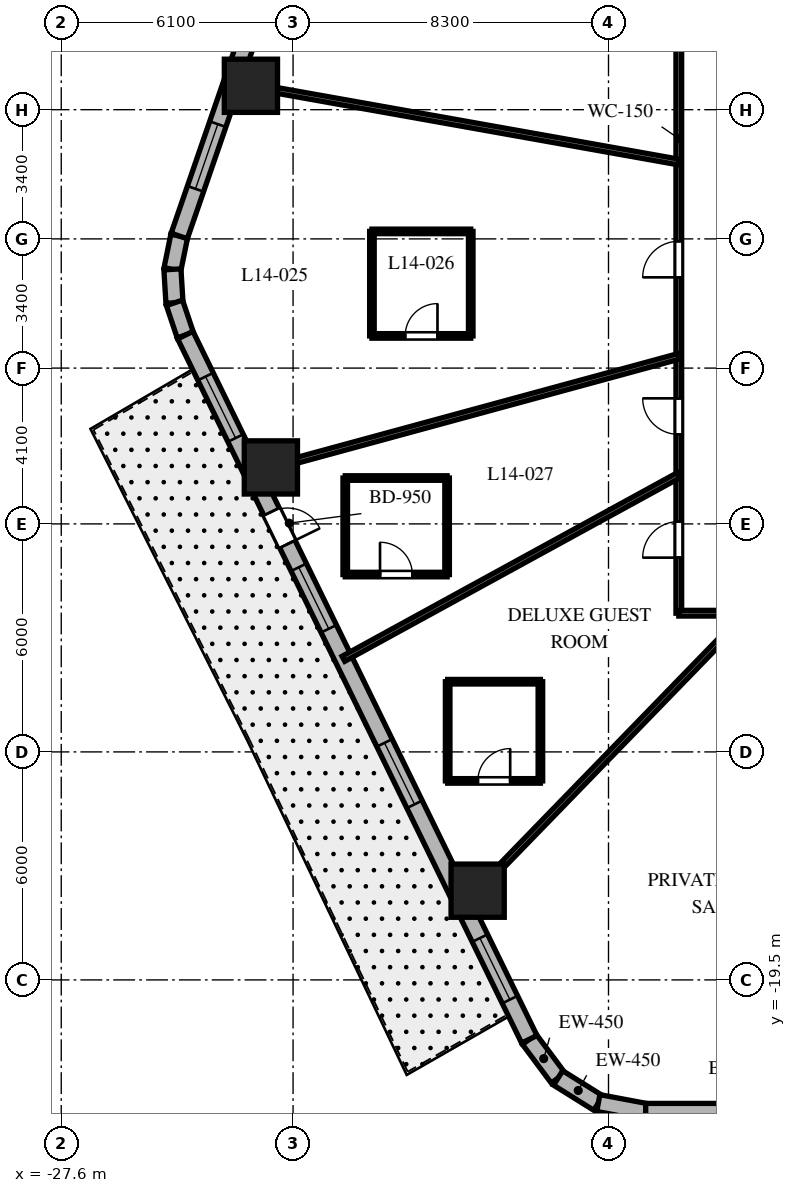
"""IFC4 building model, lengths in metres.
Left out: names, types, materials, properties, quantities, classifications, styles, units other than length and angle.
Written with IfcOpenShell. Run it as: python <this file> out.ifc"""

import sys

from ifc_helpers import new_model, si_unit, direction, frame, frame_2d, origin, origin_2d, place, context, subcontext, project, spatial, rectangle, extrude, element, fill, save


model = new_model("IFC4")
c1 = context("Model", 3, precision=1e-05, world=origin(), true_north=direction((0.0, 1.0)))
c2 = subcontext(c1, "Body", "Model", "MODEL_VIEW")
j1 = project(units=[si_unit("LENGTHUNIT", "METRE"), si_unit("PLANEANGLEUNIT", "RADIAN")], contexts=[c1])
p1 = place(None, origin())
s1 = spatial("IfcSite", under=j1, at=p1, CompositionType="ELEMENT")
p2 = place(p1, origin())
s2 = spatial("IfcBuilding", under=s1, at=p2, CompositionType="ELEMENT")
p3 = place(p2, frame((0.0, 0.0, 63.8)))
s3 = spatial("IfcBuildingStorey", under=s2, at=p3, CompositionType="ELEMENT", Elevation=63.8)
for number, where, z_axis, x_axis in (
    (1, (-22.609, 4.029, 0.0), (0.0, 0.0, 1.0), (1.0, 0.0, 0.0)),
    (2, (-22.084, -6.014, 0.0), (0.0, 0.0, 1.0), (1.0, 0.0, 0.0)),
    (3, (-16.643, -17.152, 0.0), (0.0, 0.0, 1.0), (1.0, 0.0, 0.0)),
):
    element("IfcColumn", number, at=place(p3, frame(where, z_axis=z_axis, x_axis=x_axis)), inside=s3, PredefinedType="COLUMN", context=c2, shape_type="SweptSolid", body=[
        extrude(rectangle(XDim=1.4, YDim=1.4, at=origin_2d()), origin(), (0.0, 0.0, 1.0), 3.7),
    ])
p4 = place(p3, frame((-15.284, -21.062, 0.0), z_axis=(0.0, 0.0, 1.0), x_axis=(0.597595366449, -0.801797841104, 0.0)))
e4 = element("IfcWall", 4, at=p4, inside=s3, PredefinedType="SOLIDWALL", context=c2, shape_type="SweptSolid", body=[
    extrude(rectangle(XDim=1.269, YDim=0.45, at=frame_2d((0.634, 0.0))), origin(), (0.0, 0.0, 1.0), 3.4),
])
p5 = place(p3, frame((-14.526, -22.08, 0.0), z_axis=(0.0, 0.0, 1.0), x_axis=(0.848185203596, -0.529699783275, 0.0)))
e5 = element("IfcWall", 5, at=p5, inside=s3, PredefinedType="SOLIDWALL", context=c2, shape_type="SweptSolid", body=[
    extrude(rectangle(XDim=1.247, YDim=0.45, at=frame_2d((0.624, 0.0))), origin(), (0.0, 0.0, 1.0), 3.4),
])
p6 = place(p3, frame((-13.468, -22.74, 0.0), z_axis=(0.0, 0.0, 1.0), x_axis=(0.982717174228, -0.185113358451, 0.0)))
e6 = element("IfcWall", 6, at=p6, inside=s3, PredefinedType="SOLIDWALL", context=c2, shape_type="SweptSolid", body=[
    extrude(rectangle(XDim=1.269, YDim=0.45, at=frame_2d((0.634, 0.0))), origin(), (0.0, 0.0, 1.0), 3.4),
])
p7 = place(p3, frame((-24.496, 0.077, 0.0), z_axis=(0.0, 0.0, 1.0), x_axis=(-0.199570594521, -0.979883451132, 0.0)))
e7 = element("IfcWall", 7, at=p7, inside=s3, PredefinedType="SOLIDWALL", context=c2, shape_type="SweptSolid", body=[
    extrude(rectangle(XDim=0.897, YDim=0.45, at=frame_2d((0.448, 0.0))), origin(), (0.0, 0.0, 1.0), 3.4),
])
p8 = place(p3, frame((-24.675, -0.802, 0.0), z_axis=(0.0, 0.0, 1.0), x_axis=(0.061188874166, -0.998126205286, 0.0)))
e8 = element("IfcWall", 8, at=p8, inside=s3, PredefinedType="SOLIDWALL", context=c2, shape_type="SweptSolid", body=[
    extrude(rectangle(XDim=0.882, YDim=0.45, at=frame_2d((0.441, 0.0))), origin(), (0.0, 0.0, 1.0), 3.4),
])
p9 = place(p3, frame((-24.621, -1.682, 0.0), z_axis=(0.0, 0.0, 1.0), x_axis=(0.317697451681, -0.948192137278, 0.0)))
e9 = element("IfcWall", 9, at=p9, inside=s3, PredefinedType="SOLIDWALL", context=c2, shape_type="SweptSolid", body=[
    extrude(rectangle(XDim=0.897, YDim=0.45, at=frame_2d((0.448, 0.0))), origin(), (0.0, 0.0, 1.0), 3.4),
])
p10 = place(p3, frame((-12.221, -22.975, 0.0), z_axis=(0.0, 0.0, 1.0), x_axis=(1.0, 0.0, 0.0)))
e10 = element("IfcWall", 10, at=p10, inside=s3, PredefinedType="SOLIDWALL", context=c2, shape_type="SweptSolid", body=[
    extrude(rectangle(XDim=26.389, YDim=0.45, at=frame_2d((13.195, 0.0))), origin(), (0.0, 0.0, 1.0), 3.4),
])
p11 = place(p10, frame((2.799, 0.0, 0.0)))
e11 = element("IfcOpeningElement", 11, at=p11, cuts=e10, PredefinedType="OPENING", context=c2, shape_type="SweptSolid", body=[
    extrude(rectangle(XDim=1.0, YDim=2.15, at=frame_2d((0.5, 1.075))), frame((0.0, 0.235, 0.0), z_axis=(0.0, -1.0, 0.0), x_axis=(1.0, 0.0, 0.0)), (0.0, 0.0, 1.0), 0.47),
])
p12 = place(p10, frame((12.296, 0.0, 0.8)))
e12 = element("IfcOpeningElement", 12, at=p12, cuts=e10, PredefinedType="OPENING", context=c2, shape_type="SweptSolid", body=[
    extrude(rectangle(XDim=1.8, YDim=1.8, at=frame_2d((0.9, 0.9))), frame((0.0, 0.235, 0.0), z_axis=(0.0, -1.0, 0.0), x_axis=(1.0, 0.0, 0.0)), (0.0, 0.0, 1.0), 0.47),
])
p13 = place(p10, frame((22.938, 0.0, 0.8)))
e13 = element("IfcOpeningElement", 13, at=p13, cuts=e10, PredefinedType="OPENING", context=c2, shape_type="SweptSolid", body=[
    extrude(rectangle(XDim=1.8, YDim=1.8, at=frame_2d((0.9, 0.9))), frame((0.0, 0.235, 0.0), z_axis=(0.0, -1.0, 0.0), x_axis=(1.0, 0.0, 0.0)), (0.0, 0.0, 1.0), 0.47),
])
p14 = place(p3, frame((-17.39, 20.678, 0.0), z_axis=(0.0, 0.0, 1.0), x_axis=(-0.326068018294, -0.945346310854, 0.0)))
e14 = element("IfcWall", 14, at=p14, inside=s3, PredefinedType="SOLIDWALL", context=c2, shape_type="SweptSolid", body=[
    extrude(rectangle(XDim=21.793, YDim=0.45, at=frame_2d((10.896, 0.0))), origin(), (0.0, 0.0, 1.0), 3.4),
])
p15 = place(p14, frame((1.26, 0.0, 0.8)))
e15 = element("IfcOpeningElement", 15, at=p15, cuts=e14, PredefinedType="OPENING", context=c2, shape_type="SweptSolid", body=[
    extrude(rectangle(XDim=1.8, YDim=1.8, at=frame_2d((0.9, 0.9))), frame((0.0, 0.235, 0.0), z_axis=(0.0, -1.0, 0.0), x_axis=(1.0, 0.0, 0.0)), (0.0, 0.0, 1.0), 0.47),
])
p16 = place(p14, frame((9.943, 0.0, 0.8)))
e16 = element("IfcOpeningElement", 16, at=p16, cuts=e14, PredefinedType="OPENING", context=c2, shape_type="SweptSolid", body=[
    extrude(rectangle(XDim=1.8, YDim=1.8, at=frame_2d((0.9, 0.9))), frame((0.0, 0.235, 0.0), z_axis=(0.0, -1.0, 0.0), x_axis=(1.0, 0.0, 0.0)), (0.0, 0.0, 1.0), 0.47),
])
p17 = place(p14, frame((18.68, 0.0, 0.8)))
e17 = element("IfcOpeningElement", 17, at=p17, cuts=e14, PredefinedType="OPENING", context=c2, shape_type="SweptSolid", body=[
    extrude(rectangle(XDim=1.8, YDim=1.8, at=frame_2d((0.9, 0.9))), frame((0.0, 0.235, 0.0), z_axis=(0.0, -1.0, 0.0), x_axis=(1.0, 0.0, 0.0)), (0.0, 0.0, 1.0), 0.47),
])
p18 = place(p3, frame((-24.336, -2.532, 0.0), z_axis=(0.0, 0.0, 1.0), x_axis=(0.438931326393, -0.898520612291, 0.0)))
e18 = element("IfcWall", 18, at=p18, inside=s3, PredefinedType="SOLIDWALL", context=c2, shape_type="SweptSolid", body=[
    extrude(rectangle(XDim=20.623, YDim=0.45, at=frame_2d((10.312, 0.0))), origin(), (0.0, 0.0, 1.0), 3.4),
])
p19 = place(p18, frame((5.171, 0.0, 0.0)))
e19 = element("IfcOpeningElement", 19, at=p19, cuts=e18, PredefinedType="OPENING", context=c2, shape_type="SweptSolid", body=[
    extrude(rectangle(XDim=0.95, YDim=2.15, at=frame_2d((0.475, 1.075))), frame((0.0, 0.235, 0.0), z_axis=(0.0, -1.0, 0.0), x_axis=(1.0, 0.0, 0.0)), (0.0, 0.0, 1.0), 0.47),
])
p20 = place(p18, frame((1.214, 0.0, 0.8)))
e20 = element("IfcOpeningElement", 20, at=p20, cuts=e18, PredefinedType="OPENING", context=c2, shape_type="SweptSolid", body=[
    extrude(rectangle(XDim=1.8, YDim=1.8, at=frame_2d((0.9, 0.9))), frame((0.0, 0.235, 0.0), z_axis=(0.0, -1.0, 0.0), x_axis=(1.0, 0.0, 0.0)), (0.0, 0.0, 1.0), 0.47),
])
p21 = place(p18, frame((6.8, 0.0, 0.8)))
e21 = element("IfcOpeningElement", 21, at=p21, cuts=e18, PredefinedType="OPENING", context=c2, shape_type="SweptSolid", body=[
    extrude(rectangle(XDim=1.8, YDim=1.8, at=frame_2d((0.9, 0.9))), frame((0.0, 0.235, 0.0), z_axis=(0.0, -1.0, 0.0), x_axis=(1.0, 0.0, 0.0)), (0.0, 0.0, 1.0), 0.47),
])
p22 = place(p18, frame((11.942, 0.0, 0.8)))
e22 = element("IfcOpeningElement", 22, at=p22, cuts=e18, PredefinedType="OPENING", context=c2, shape_type="SweptSolid", body=[
    extrude(rectangle(XDim=1.8, YDim=1.8, at=frame_2d((0.9, 0.9))), frame((0.0, 0.235, 0.0), z_axis=(0.0, -1.0, 0.0), x_axis=(1.0, 0.0, 0.0)), (0.0, 0.0, 1.0), 0.47),
])
p23 = place(p18, frame((17.66, 0.0, 0.8)))
e23 = element("IfcOpeningElement", 23, at=p23, cuts=e18, PredefinedType="OPENING", context=c2, shape_type="SweptSolid", body=[
    extrude(rectangle(XDim=1.8, YDim=1.8, at=frame_2d((0.9, 0.9))), frame((0.0, 0.235, 0.0), z_axis=(0.0, -1.0, 0.0), x_axis=(1.0, 0.0, 0.0)), (0.0, 0.0, 1.0), 0.47),
])
p24 = place(p3, frame((-11.35, -9.85, 0.0), z_axis=(0.0, 0.0, 1.0), x_axis=(0.0, 1.0, 0.0)))
e24 = element("IfcWall", 24, at=p24, inside=s3, PredefinedType="PARTITIONING", context=c2, shape_type="SweptSolid", body=[
    extrude(rectangle(XDim=19.7, YDim=0.15, at=frame_2d((9.85, 0.0))), origin(), (0.0, 0.0, 1.0), 2.84),
])
p25 = place(p24, frame((15.191, 0.0, 0.0)))
e25 = element("IfcOpeningElement", 25, at=p25, cuts=e24, PredefinedType="OPENING", context=c2, shape_type="SweptSolid", body=[
    extrude(rectangle(XDim=0.95, YDim=2.03, at=frame_2d((0.475, 1.015))), frame((0.0, 0.085, 0.0), z_axis=(0.0, -1.0, 0.0), x_axis=(1.0, 0.0, 0.0)), (0.0, 0.0, 1.0), 0.17),
])
p26 = place(p24, frame((8.838, 0.0, 0.0)))
e26 = element("IfcOpeningElement", 26, at=p26, cuts=e24, PredefinedType="OPENING", context=c2, shape_type="SweptSolid", body=[
    extrude(rectangle(XDim=0.95, YDim=2.03, at=frame_2d((0.475, 1.015))), frame((0.0, 0.085, 0.0), z_axis=(0.0, -1.0, 0.0), x_axis=(1.0, 0.0, 0.0)), (0.0, 0.0, 1.0), 0.17),
])
p27 = place(p24, frame((4.704, 0.0, 0.0)))
e27 = element("IfcOpeningElement", 27, at=p27, cuts=e24, PredefinedType="OPENING", context=c2, shape_type="SweptSolid", body=[
    extrude(rectangle(XDim=0.95, YDim=2.03, at=frame_2d((0.475, 1.015))), frame((0.0, 0.085, 0.0), z_axis=(0.0, -1.0, 0.0), x_axis=(1.0, 0.0, 0.0)), (0.0, 0.0, 1.0), 0.17),
])
p28 = place(p24, frame((1.462, 0.0, 0.0)))
e28 = element("IfcOpeningElement", 28, at=p28, cuts=e24, PredefinedType="OPENING", context=c2, shape_type="SweptSolid", body=[
    extrude(rectangle(XDim=0.95, YDim=2.03, at=frame_2d((0.475, 1.015))), frame((0.0, 0.085, 0.0), z_axis=(0.0, -1.0, 0.0), x_axis=(1.0, 0.0, 0.0)), (0.0, 0.0, 1.0), 0.17),
])
p29 = place(p3, frame((11.35, -9.85, 0.0), z_axis=(0.0, 0.0, 1.0), x_axis=(-1.0, 0.0, 0.0)))
e29 = element("IfcWall", 29, at=p29, inside=s3, PredefinedType="PARTITIONING", context=c2, shape_type="SweptSolid", body=[
    extrude(rectangle(XDim=22.7, YDim=0.15, at=frame_2d((11.35, 0.0))), origin(), (0.0, 0.0, 1.0), 2.84),
])
p30 = place(p29, frame((17.225, 0.0, 0.0)))
e30 = element("IfcOpeningElement", 30, at=p30, cuts=e29, PredefinedType="OPENING", context=c2, shape_type="SweptSolid", body=[
    extrude(rectangle(XDim=0.95, YDim=2.03, at=frame_2d((0.475, 1.015))), frame((0.0, 0.085, 0.0), z_axis=(0.0, -1.0, 0.0), x_axis=(1.0, 0.0, 0.0)), (0.0, 0.0, 1.0), 0.17),
])
p31 = place(p29, frame((10.444, 0.0, 0.0)))
e31 = element("IfcOpeningElement", 31, at=p31, cuts=e29, PredefinedType="OPENING", context=c2, shape_type="SweptSolid", body=[
    extrude(rectangle(XDim=0.95, YDim=2.03, at=frame_2d((0.475, 1.015))), frame((0.0, 0.085, 0.0), z_axis=(0.0, -1.0, 0.0), x_axis=(1.0, 0.0, 0.0)), (0.0, 0.0, 1.0), 0.17),
])
p32 = place(p29, frame((3.369, 0.0, 0.0)))
e32 = element("IfcOpeningElement", 32, at=p32, cuts=e29, PredefinedType="OPENING", context=c2, shape_type="SweptSolid", body=[
    extrude(rectangle(XDim=0.95, YDim=2.03, at=frame_2d((0.475, 1.015))), frame((0.0, 0.085, 0.0), z_axis=(0.0, -1.0, 0.0), x_axis=(1.0, 0.0, 0.0)), (0.0, 0.0, 1.0), 0.17),
])
p33 = place(p3, frame((-11.35, 2.023, 0.0), z_axis=(0.0, 0.0, 1.0), x_axis=(-0.984493741877, 0.17541970301, 0.0)))
e33 = element("IfcWall", 33, at=p33, inside=s3, PredefinedType="PARTITIONING", context=c2, shape_type="SweptSolid", body=[
    extrude(rectangle(XDim=11.937, YDim=0.15, at=frame_2d((5.969, 0.0))), origin(), (0.0, 0.0, 1.0), 2.54),
])
p34 = place(p3, frame((-11.35, -3.091, 0.0), z_axis=(0.0, 0.0, 1.0), x_axis=(-0.964859685283, -0.262765651704, 0.0)))
e34 = element("IfcWall", 34, at=p34, inside=s3, PredefinedType="PARTITIONING", context=c2, shape_type="SweptSolid", body=[
    extrude(rectangle(XDim=11.629, YDim=0.15, at=frame_2d((5.814, 0.0))), origin(), (0.0, 0.0, 1.0), 2.54),
])
p35 = place(p3, frame((-11.35, -6.217, 0.0), z_axis=(0.0, 0.0, 1.0), x_axis=(-0.877047587135, -0.480403507378, 0.0)))
e35 = element("IfcWall", 35, at=p35, inside=s3, PredefinedType="PARTITIONING", context=c2, shape_type="SweptSolid", body=[
    extrude(rectangle(XDim=10.062, YDim=0.15, at=frame_2d((5.031, 0.0))), origin(), (0.0, 0.0, 1.0), 2.54),
])
p36 = place(p3, frame((-9.558, -9.85, 0.0), z_axis=(0.0, 0.0, 1.0), x_axis=(-0.69638346089, -0.717669893056, 0.0)))
e36 = element("IfcWall", 36, at=p36, inside=s3, PredefinedType="PARTITIONING", context=c2, shape_type="SweptSolid", body=[
    extrude(rectangle(XDim=10.701, YDim=0.15, at=frame_2d((5.351, 0.0))), origin(), (0.0, 0.0, 1.0), 2.54),
])
p37 = place(p3, frame((-19.425, -2.553, 0.0), z_axis=(0.0, 0.0, 1.0), x_axis=(1.0, 0.0, 0.0)))
e37 = element("IfcWall", 37, at=p37, inside=s3, PredefinedType="PARTITIONING", context=c2, shape_type="SweptSolid", body=[
    extrude(rectangle(XDim=2.6, YDim=0.12, at=frame_2d((1.3, 0.0))), origin(), (0.0, 0.0, 1.0), 2.84),
])
p38 = place(p37, frame((0.875, 0.0, 0.0)))
e38 = element("IfcOpeningElement", 38, at=p38, cuts=e37, PredefinedType="OPENING", context=c2, shape_type="SweptSolid", body=[
    extrude(rectangle(XDim=0.85, YDim=2.03, at=frame_2d((0.425, 1.015))), frame((0.0, 0.07, 0.0), z_axis=(0.0, -1.0, 0.0), x_axis=(1.0, 0.0, 0.0)), (0.0, 0.0, 1.0), 0.14),
])
p39 = place(p3, frame((-16.825, -2.553, 0.0), z_axis=(0.0, 0.0, 1.0), x_axis=(0.0, 1.0, 0.0)))
e39 = element("IfcWall", 39, at=p39, inside=s3, PredefinedType="PARTITIONING", context=c2, shape_type="SweptSolid", body=[
    extrude(rectangle(XDim=2.75, YDim=0.12, at=frame_2d((1.375, 0.0))), origin(), (0.0, 0.0, 1.0), 3.4),
])
p40 = place(p3, frame((-16.825, 0.197, 0.0), z_axis=(0.0, 0.0, 1.0), x_axis=(-1.0, 0.0, 0.0)))
e40 = element("IfcWall", 40, at=p40, inside=s3, PredefinedType="PARTITIONING", context=c2, shape_type="SweptSolid", body=[
    extrude(rectangle(XDim=2.6, YDim=0.12, at=frame_2d((1.3, 0.0))), origin(), (0.0, 0.0, 1.0), 2.84),
])
p41 = place(p3, frame((-19.425, 0.197, 0.0), z_axis=(0.0, 0.0, 1.0), x_axis=(0.0, -1.0, 0.0)))
e41 = element("IfcWall", 41, at=p41, inside=s3, PredefinedType="PARTITIONING", context=c2, shape_type="SweptSolid", body=[
    extrude(rectangle(XDim=2.75, YDim=0.12, at=frame_2d((1.375, 0.0))), origin(), (0.0, 0.0, 1.0), 3.4),
])
p42 = place(p3, frame((-20.127, -8.833, 0.0), z_axis=(0.0, 0.0, 1.0), x_axis=(1.0, 0.0, 0.0)))
e42 = element("IfcWall", 42, at=p42, inside=s3, PredefinedType="PARTITIONING", context=c2, shape_type="SweptSolid", body=[
    extrude(rectangle(XDim=2.68, YDim=0.12, at=frame_2d((1.34, 0.0))), origin(), (0.0, 0.0, 1.0), 3.4),
])
p43 = place(p42, frame((0.915, 0.0, 0.0)))
e43 = element("IfcOpeningElement", 43, at=p43, cuts=e42, PredefinedType="OPENING", context=c2, shape_type="SweptSolid", body=[
    extrude(rectangle(XDim=0.85, YDim=2.03, at=frame_2d((0.425, 1.015))), frame((0.0, 0.07, 0.0), z_axis=(0.0, -1.0, 0.0), x_axis=(1.0, 0.0, 0.0)), (0.0, 0.0, 1.0), 0.14),
])
p44 = place(p3, frame((-17.447, -8.833, 0.0), z_axis=(0.0, 0.0, 1.0), x_axis=(0.0, 1.0, 0.0)))
e44 = element("IfcWall", 44, at=p44, inside=s3, PredefinedType="PARTITIONING", context=c2, shape_type="SweptSolid", body=[
    extrude(rectangle(XDim=2.54, YDim=0.12, at=frame_2d((1.27, 0.0))), origin(), (0.0, 0.0, 1.0), 2.84),
])
p45 = place(p3, frame((-17.447, -6.293, 0.0), z_axis=(0.0, 0.0, 1.0), x_axis=(-1.0, 0.0, 0.0)))
e45 = element("IfcWall", 45, at=p45, inside=s3, PredefinedType="PARTITIONING", context=c2, shape_type="SweptSolid", body=[
    extrude(rectangle(XDim=2.68, YDim=0.12, at=frame_2d((1.34, 0.0))), origin(), (0.0, 0.0, 1.0), 2.84),
])
p46 = place(p3, frame((-20.127, -6.293, 0.0), z_axis=(0.0, 0.0, 1.0), x_axis=(0.0, -1.0, 0.0)))
e46 = element("IfcWall", 46, at=p46, inside=s3, PredefinedType="PARTITIONING", context=c2, shape_type="SweptSolid", body=[
    extrude(rectangle(XDim=2.54, YDim=0.12, at=frame_2d((1.27, 0.0))), origin(), (0.0, 0.0, 1.0), 2.84),
])
p47 = place(p3, frame((-17.432, -14.263, 0.0), z_axis=(0.0, 0.0, 1.0), x_axis=(1.0, 0.0, 0.0)))
e47 = element("IfcWall", 47, at=p47, inside=s3, PredefinedType="PARTITIONING", context=c2, shape_type="SweptSolid", body=[
    extrude(rectangle(XDim=2.44, YDim=0.12, at=frame_2d((1.22, 0.0))), origin(), (0.0, 0.0, 1.0), 3.4),
])
p48 = place(p47, frame((0.795, 0.0, 0.0)))
e48 = element("IfcOpeningElement", 48, at=p48, cuts=e47, PredefinedType="OPENING", context=c2, shape_type="SweptSolid", body=[
    extrude(rectangle(XDim=0.85, YDim=2.03, at=frame_2d((0.425, 1.015))), frame((0.0, 0.07, 0.0), z_axis=(0.0, -1.0, 0.0), x_axis=(1.0, 0.0, 0.0)), (0.0, 0.0, 1.0), 0.14),
])
p49 = place(p3, frame((-14.992, -14.263, 0.0), z_axis=(0.0, 0.0, 1.0), x_axis=(0.0, 1.0, 0.0)))
e49 = element("IfcWall", 49, at=p49, inside=s3, PredefinedType="PARTITIONING", context=c2, shape_type="SweptSolid", body=[
    extrude(rectangle(XDim=2.61, YDim=0.12, at=frame_2d((1.305, 0.0))), origin(), (0.0, 0.0, 1.0), 2.927),
])
p50 = place(p3, frame((-14.992, -11.653, 0.0), z_axis=(0.0, 0.0, 1.0), x_axis=(-1.0, 0.0, 0.0)))
e50 = element("IfcWall", 50, at=p50, inside=s3, PredefinedType="PARTITIONING", context=c2, shape_type="SweptSolid", body=[
    extrude(rectangle(XDim=2.44, YDim=0.12, at=frame_2d((1.22, 0.0))), origin(), (0.0, 0.0, 1.0), 2.927),
])
p51 = place(p3, frame((-17.432, -11.653, 0.0), z_axis=(0.0, 0.0, 1.0), x_axis=(0.0, -1.0, 0.0)))
e51 = element("IfcWall", 51, at=p51, inside=s3, PredefinedType="PARTITIONING", context=c2, shape_type="SweptSolid", body=[
    extrude(rectangle(XDim=2.61, YDim=0.12, at=frame_2d((1.305, 0.0))), origin(), (0.0, 0.0, 1.0), 3.4),
])
p52 = place(p17, origin())
e52 = element("IfcWindow", 52, at=p52, inside=s3, PartitioningType="SINGLE_PANEL", PredefinedType="WINDOW", context=c2, shape_type="SweptSolid", body=[
    extrude(rectangle(XDim=1.8, YDim=1.8, at=frame_2d((0.9, 0.9))), frame((0.0, 0.03, 0.0), z_axis=(0.0, -1.0, 0.0), x_axis=(1.0, 0.0, 0.0)), (0.0, 0.0, 1.0), 0.06),
])
fill(e17, e52)
p53 = place(p19, origin())
e53 = element("IfcDoor", 53, at=p53, inside=s3, OperationType="SINGLE_SWING_RIGHT", PredefinedType="DOOR", context=c2, shape_type="SweptSolid", body=[
    extrude(rectangle(XDim=0.95, YDim=2.15, at=frame_2d((0.475, 1.075))), frame((0.0, 0.025, 0.0), z_axis=(0.0, -1.0, 0.0), x_axis=(1.0, 0.0, 0.0)), (0.0, 0.0, 1.0), 0.05),
])
fill(e19, e53)
p54 = place(p20, origin())
e54 = element("IfcWindow", 54, at=p54, inside=s3, PartitioningType="SINGLE_PANEL", PredefinedType="WINDOW", context=c2, shape_type="SweptSolid", body=[
    extrude(rectangle(XDim=1.8, YDim=1.8, at=frame_2d((0.9, 0.9))), frame((0.0, 0.03, 0.0), z_axis=(0.0, -1.0, 0.0), x_axis=(1.0, 0.0, 0.0)), (0.0, 0.0, 1.0), 0.06),
])
fill(e20, e54)
p55 = place(p21, origin())
e55 = element("IfcWindow", 55, at=p55, inside=s3, PartitioningType="SINGLE_PANEL", PredefinedType="WINDOW", context=c2, shape_type="SweptSolid", body=[
    extrude(rectangle(XDim=1.8, YDim=1.8, at=frame_2d((0.9, 0.9))), frame((0.0, 0.03, 0.0), z_axis=(0.0, -1.0, 0.0), x_axis=(1.0, 0.0, 0.0)), (0.0, 0.0, 1.0), 0.06),
])
fill(e21, e55)
p56 = place(p22, origin())
e56 = element("IfcWindow", 56, at=p56, inside=s3, PartitioningType="SINGLE_PANEL", PredefinedType="WINDOW", context=c2, shape_type="SweptSolid", body=[
    extrude(rectangle(XDim=1.8, YDim=1.8, at=frame_2d((0.9, 0.9))), frame((0.0, 0.03, 0.0), z_axis=(0.0, -1.0, 0.0), x_axis=(1.0, 0.0, 0.0)), (0.0, 0.0, 1.0), 0.06),
])
fill(e22, e56)
p57 = place(p23, origin())
e57 = element("IfcWindow", 57, at=p57, inside=s3, PartitioningType="SINGLE_PANEL", PredefinedType="WINDOW", context=c2, shape_type="SweptSolid", body=[
    extrude(rectangle(XDim=1.8, YDim=1.8, at=frame_2d((0.9, 0.9))), frame((0.0, 0.03, 0.0), z_axis=(0.0, -1.0, 0.0), x_axis=(1.0, 0.0, 0.0)), (0.0, 0.0, 1.0), 0.06),
])
fill(e23, e57)
p58 = place(p26, origin())
e58 = element("IfcDoor", 58, at=p58, inside=s3, OperationType="SINGLE_SWING_LEFT", PredefinedType="DOOR", context=c2, shape_type="SweptSolid", body=[
    extrude(rectangle(XDim=0.95, YDim=2.03, at=frame_2d((0.475, 1.015))), frame((0.0, 0.025, 0.0), z_axis=(0.0, -1.0, 0.0), x_axis=(1.0, 0.0, 0.0)), (0.0, 0.0, 1.0), 0.05),
])
fill(e26, e58)
p59 = place(p38, origin())
e59 = element("IfcDoor", 59, at=p59, inside=s3, OperationType="SINGLE_SWING_RIGHT", PredefinedType="DOOR", context=c2, shape_type="SweptSolid", body=[
    extrude(rectangle(XDim=0.85, YDim=2.03, at=frame_2d((0.425, 1.015))), frame((0.0, 0.025, 0.0), z_axis=(0.0, -1.0, 0.0), x_axis=(1.0, 0.0, 0.0)), (0.0, 0.0, 1.0), 0.05),
])
fill(e38, e59)
p60 = place(p27, origin())
e60 = element("IfcDoor", 60, at=p60, inside=s3, OperationType="SINGLE_SWING_RIGHT", PredefinedType="DOOR", context=c2, shape_type="SweptSolid", body=[
    extrude(rectangle(XDim=0.95, YDim=2.03, at=frame_2d((0.475, 1.015))), frame((0.0, 0.025, 0.0), z_axis=(0.0, -1.0, 0.0), x_axis=(1.0, 0.0, 0.0)), (0.0, 0.0, 1.0), 0.05),
])
fill(e27, e60)
p61 = place(p43, origin())
e61 = element("IfcDoor", 61, at=p61, inside=s3, OperationType="SINGLE_SWING_LEFT", PredefinedType="DOOR", context=c2, shape_type="SweptSolid", body=[
    extrude(rectangle(XDim=0.85, YDim=2.03, at=frame_2d((0.425, 1.015))), frame((0.0, 0.025, 0.0), z_axis=(0.0, -1.0, 0.0), x_axis=(1.0, 0.0, 0.0)), (0.0, 0.0, 1.0), 0.05),
])
fill(e43, e61)
p62 = place(p28, origin())
e62 = element("IfcDoor", 62, at=p62, inside=s3, OperationType="SINGLE_SWING_LEFT", PredefinedType="DOOR", context=c2, shape_type="SweptSolid", body=[
    extrude(rectangle(XDim=0.95, YDim=2.03, at=frame_2d((0.475, 1.015))), frame((0.0, 0.025, 0.0), z_axis=(0.0, -1.0, 0.0), x_axis=(1.0, 0.0, 0.0)), (0.0, 0.0, 1.0), 0.05),
])
fill(e28, e62)
p63 = place(p48, origin())
e63 = element("IfcDoor", 63, at=p63, inside=s3, OperationType="SINGLE_SWING_RIGHT", PredefinedType="DOOR", context=c2, shape_type="SweptSolid", body=[
    extrude(rectangle(XDim=0.85, YDim=2.03, at=frame_2d((0.425, 1.015))), frame((0.0, 0.025, 0.0), z_axis=(0.0, -1.0, 0.0), x_axis=(1.0, 0.0, 0.0)), (0.0, 0.0, 1.0), 0.05),
])
fill(e48, e63)
save(model, sys.argv[1])
